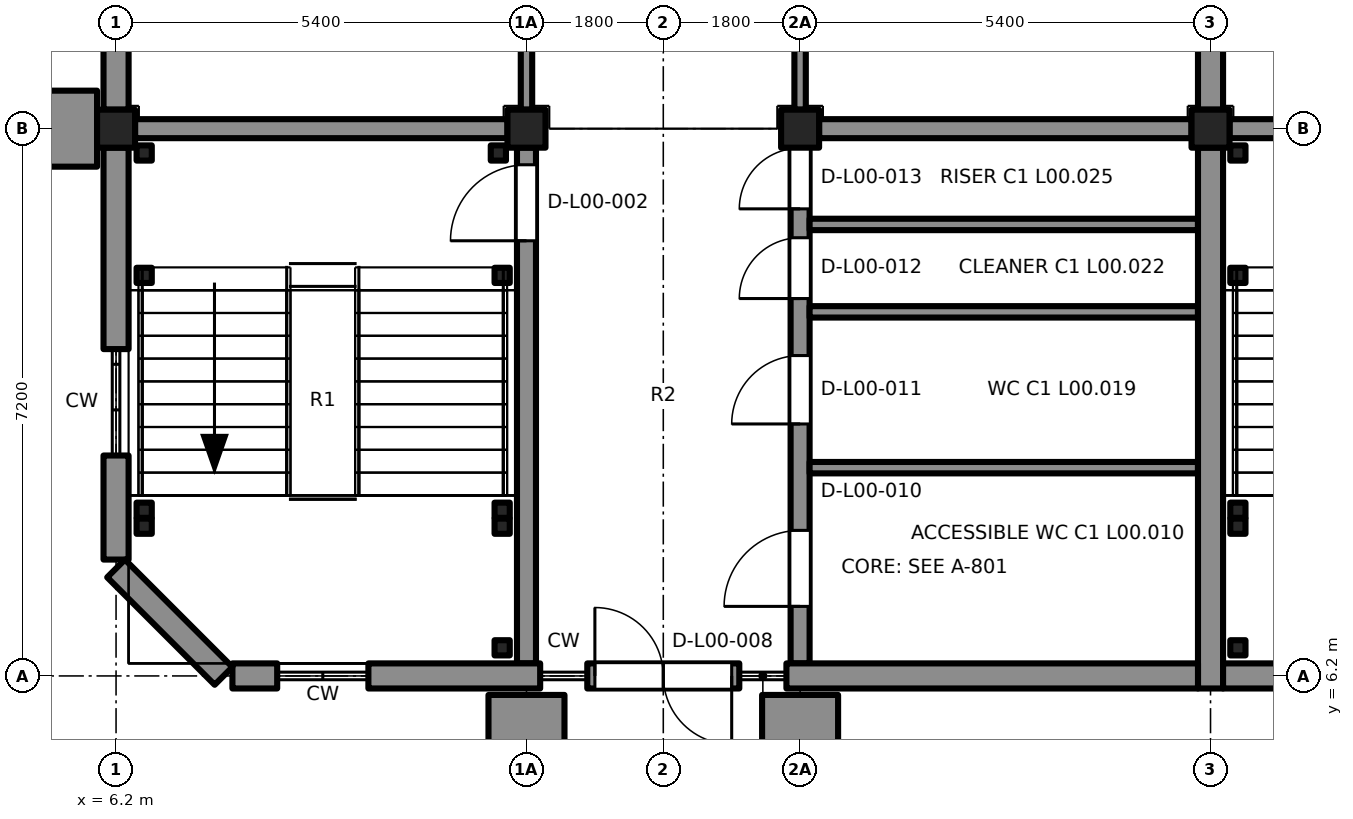
"""IFC4 building model, lengths in metres.
Left out: names, types, materials, properties, quantities, classifications, styles, units other than length and angle.
Written with IfcOpenShell. Run it as: python <this file> out.ifc"""

import sys

from ifc_helpers import new_model, si_unit, direction, frame, frame_2d, origin, origin_2d, place, context, subcontext, project, spatial, rectangle, extrude, element, fill, save


model = new_model("IFC4")
c1 = context("Model", 3, precision=1e-05, world=origin(), true_north=direction((0.0, 1.0)))
c2 = subcontext(c1, "Body", "Model", "MODEL_VIEW")
j1 = project(units=[si_unit("LENGTHUNIT", "METRE"), si_unit("PLANEANGLEUNIT", "RADIAN")], contexts=[c1])
p1 = place(None, origin())
s1 = spatial("IfcSite", under=j1, at=p1, CompositionType="ELEMENT")
p2 = place(p1, origin())
s2 = spatial("IfcBuilding", under=s1, at=p2, CompositionType="ELEMENT")
p3 = place(p2, origin())
s3 = spatial("IfcBuildingStorey", under=s2, at=p3, CompositionType="ELEMENT", Elevation=0.0)
for number, where, z_axis, x_axis in (
    (1, (6.2, 13.4, -0.2), (0.0, 0.0, 1.0), (1.0, 0.0, 0.0)),
    (2, (11.6, 13.4, -0.2), (0.0, 0.0, 1.0), (1.0, 0.0, 0.0)),
    (3, (15.2, 13.4, -0.2), (0.0, 0.0, 1.0), (1.0, 0.0, 0.0)),
    (4, (20.6, 13.4, -0.2), (0.0, 0.0, 1.0), (1.0, 0.0, 0.0)),
):
    element("IfcColumn", number, at=place(p3, frame(where, z_axis=z_axis, x_axis=x_axis)), inside=s3, PredefinedType="COLUMN", context=c2, shape_type="SweptSolid", body=[
        extrude(rectangle(XDim=0.5, YDim=0.5, at=origin_2d()), origin(), (0.0, 0.0, 1.0), 5.45),
    ])
p4 = place(p3, frame((11.6, 6.365, 0.0), z_axis=(0.0, 0.0, 1.0), x_axis=(0.0, 1.0, 0.0)))
e5 = element("IfcWall", 5, at=p4, inside=s3, PredefinedType="SHEAR", context=c2, shape_type="SweptSolid", body=[
    extrude(rectangle(XDim=6.785, YDim=0.25, at=frame_2d((3.393, 0.0))), origin(), (0.0, 0.0, 1.0), 6.05),
])
p5 = place(p4, frame((5.56, 0.0, 0.0)))
e6 = element("IfcOpeningElement", 6, at=p5, cuts=e5, PredefinedType="OPENING", context=c2, shape_type="SweptSolid", body=[
    extrude(rectangle(XDim=1.0, YDim=2.1, at=frame_2d((0.5, 1.05))), frame((0.0, 0.135, 0.0), z_axis=(0.0, -1.0, 0.0), x_axis=(1.0, 0.0, 0.0)), (0.0, 0.0, 1.0), 0.27),
])
p6 = place(p3, frame((6.45, 13.4, 0.0), z_axis=(0.0, 0.0, 1.0), x_axis=(1.0, 0.0, 0.0)))
e7 = element("IfcWall", 7, at=p6, inside=s3, PredefinedType="SHEAR", context=c2, shape_type="SweptSolid", body=[
    extrude(rectangle(XDim=4.9, YDim=0.25, at=frame_2d((2.45, 0.0))), origin(), (0.0, 0.0, 1.0), 6.05),
])
p7 = place(p3, frame((15.2, 6.365, 0.0), z_axis=(0.0, 0.0, 1.0), x_axis=(0.0, 1.0, 0.0)))
e8 = element("IfcWall", 8, at=p7, inside=s3, PredefinedType="SHEAR", context=c2, shape_type="SweptSolid", body=[
    extrude(rectangle(XDim=6.785, YDim=0.25, at=frame_2d((3.393, 0.0))), origin(), (0.0, 0.0, 1.0), 6.05),
])
p8 = place(p7, frame((0.75, 0.0, 0.0)))
e9 = element("IfcOpeningElement", 9, at=p8, cuts=e8, PredefinedType="OPENING", context=c2, shape_type="SweptSolid", body=[
    extrude(rectangle(XDim=1.0, YDim=2.1, at=frame_2d((0.5, 1.05))), frame((0.0, 0.135, 0.0), z_axis=(0.0, -1.0, 0.0), x_axis=(1.0, 0.0, 0.0)), (0.0, 0.0, 1.0), 0.27),
])
p9 = place(p7, frame((3.15, 0.0, 0.0)))
e10 = element("IfcOpeningElement", 10, at=p9, cuts=e8, PredefinedType="OPENING", context=c2, shape_type="SweptSolid", body=[
    extrude(rectangle(XDim=0.9, YDim=2.1, at=frame_2d((0.45, 1.05))), frame((0.0, 0.135, 0.0), z_axis=(0.0, -1.0, 0.0), x_axis=(1.0, 0.0, 0.0)), (0.0, 0.0, 1.0), 0.27),
])
p10 = place(p7, frame((4.8, 0.0, 0.0)))
e11 = element("IfcOpeningElement", 11, at=p10, cuts=e8, PredefinedType="OPENING", context=c2, shape_type="SweptSolid", body=[
    extrude(rectangle(XDim=0.8, YDim=2.1, at=frame_2d((0.4, 1.05))), frame((0.0, 0.135, 0.0), z_axis=(0.0, -1.0, 0.0), x_axis=(1.0, 0.0, 0.0)), (0.0, 0.0, 1.0), 0.27),
])
p11 = place(p7, frame((5.98, 0.0, 0.0)))
e12 = element("IfcOpeningElement", 12, at=p11, cuts=e8, PredefinedType="OPENING", context=c2, shape_type="SweptSolid", body=[
    extrude(rectangle(XDim=0.8, YDim=2.1, at=frame_2d((0.4, 1.05))), frame((0.0, 0.135, 0.0), z_axis=(0.0, -1.0, 0.0), x_axis=(1.0, 0.0, 0.0)), (0.0, 0.0, 1.0), 0.27),
])
p12 = place(p3, frame((15.45, 13.4, 0.0), z_axis=(0.0, 0.0, 1.0), x_axis=(1.0, 0.0, 0.0)))
e13 = element("IfcWall", 13, at=p12, inside=s3, PredefinedType="SHEAR", context=c2, shape_type="SweptSolid", body=[
    extrude(rectangle(XDim=4.9, YDim=0.25, at=frame_2d((2.45, 0.0))), origin(), (0.0, 0.0, 1.0), 6.05),
])
for number, where, z_axis, x_axis in (
    (14, (15.325, 8.94, 0.0), (0.0, 0.0, 1.0), (1.0, 0.0, 0.0)),
    (15, (15.325, 10.99, 0.0), (0.0, 0.0, 1.0), (1.0, 0.0, 0.0)),
    (16, (15.325, 12.14, 0.0), (0.0, 0.0, 1.0), (1.0, 0.0, 0.0)),
):
    element("IfcWall", number, at=place(p3, frame(where, z_axis=z_axis, x_axis=x_axis)), inside=s3, PredefinedType="PARTITIONING", context=c2, shape_type="SweptSolid", body=[
        extrude(rectangle(XDim=5.11, YDim=0.15, at=frame_2d((2.555, 0.0))), origin(), (0.0, 0.0, 1.0), 6.05),
    ])
p13 = place(p3, frame((6.57, 8.38, 0.0), z_axis=(0.0, 0.0, 1.0), x_axis=(1.0, 0.0, 0.0)))
e17 = element("IfcColumn", 17, at=p13, inside=s3, PredefinedType="COLUMN", context=c2, shape_type="SweptSolid", body=[
    extrude(rectangle(XDim=0.2, YDim=0.2, at=origin_2d()), origin(), (0.0, 0.0, 1.0), 4.45),
])
p14 = place(p3, frame((11.28, 6.57, 0.0), z_axis=(0.0, 0.0, 1.0), x_axis=(1.0, 0.0, 0.0)))
e18 = element("IfcColumn", 18, at=p14, inside=s3, PredefinedType="COLUMN", context=c2, shape_type="SweptSolid", body=[
    extrude(rectangle(XDim=0.2, YDim=0.2, at=origin_2d()), origin(), (0.0, 0.0, 1.0), 6.3),
])
p15 = place(p3, frame((11.28, 8.38, 0.0), z_axis=(0.0, 0.0, 1.0), x_axis=(1.0, 0.0, 0.0)))
e19 = element("IfcColumn", 19, at=p15, inside=s3, PredefinedType="COLUMN", context=c2, shape_type="SweptSolid", body=[
    extrude(rectangle(XDim=0.2, YDim=0.2, at=origin_2d()), origin(), (0.0, 0.0, 1.0), 4.45),
])
for number, where, z_axis, x_axis in (
    (20, (6.57, 11.47, 0.0), (0.0, 0.0, 1.0), (1.0, 0.0, 0.0)),
    (21, (6.57, 13.08, 0.0), (0.0, 0.0, 1.0), (1.0, 0.0, 0.0)),
    (22, (11.28, 11.47, 0.0), (0.0, 0.0, 1.0), (1.0, 0.0, 0.0)),
    (23, (11.23, 13.08, 0.0), (0.0, 0.0, 1.0), (1.0, 0.0, 0.0)),
):
    element("IfcColumn", number, at=place(p3, frame(where, z_axis=z_axis, x_axis=x_axis)), inside=s3, PredefinedType="COLUMN", context=c2, shape_type="SweptSolid", body=[
        extrude(rectangle(XDim=0.2, YDim=0.2, at=origin_2d()), origin(), (0.0, 0.0, 1.0), 2.95),
    ])
for number, where, z_axis, x_axis in (
    (24, (6.57, 8.17, 0.0), (0.0, 0.0, 1.0), (1.0, 0.0, 0.0)),
    (25, (11.28, 8.17, 0.0), (0.0, 0.0, 1.0), (1.0, 0.0, 0.0)),
):
    element("IfcColumn", number, at=place(p3, frame(where, z_axis=z_axis, x_axis=x_axis)), inside=s3, PredefinedType="COLUMN", context=c2, shape_type="SweptSolid", body=[
        extrude(rectangle(XDim=0.2, YDim=0.2, at=origin_2d()), origin(), (0.0, 0.0, 1.0), 6.3),
    ])
p16 = place(p3, frame((20.85, 13.4, 0.0), z_axis=(0.0, 0.0, 1.0), x_axis=(1.0, 0.0, 0.0)))
e26 = element("IfcWall", 26, at=p16, inside=s3, PredefinedType="SHEAR", context=c2, shape_type="SweptSolid", body=[
    extrude(rectangle(XDim=4.9, YDim=0.25, at=frame_2d((2.45, 0.0))), origin(), (0.0, 0.0, 1.0), 6.05),
])
p17 = place(p3, frame((20.96, 6.57, 0.0), z_axis=(0.0, 0.0, 1.0), x_axis=(1.0, 0.0, 0.0)))
e27 = element("IfcColumn", 27, at=p17, inside=s3, PredefinedType="COLUMN", context=c2, shape_type="SweptSolid", body=[
    extrude(rectangle(XDim=0.2, YDim=0.2, at=origin_2d()), origin(), (0.0, 0.0, 1.0), 6.3),
])
p18 = place(p3, frame((20.96, 8.38, 0.0), z_axis=(0.0, 0.0, 1.0), x_axis=(1.0, 0.0, 0.0)))
e28 = element("IfcColumn", 28, at=p18, inside=s3, PredefinedType="COLUMN", context=c2, shape_type="SweptSolid", body=[
    extrude(rectangle(XDim=0.2, YDim=0.2, at=origin_2d()), origin(), (0.0, 0.0, 1.0), 4.45),
])
for number, where, z_axis, x_axis in (
    (29, (20.96, 11.47, 0.0), (0.0, 0.0, 1.0), (1.0, 0.0, 0.0)),
    (30, (20.96, 13.08, 0.0), (0.0, 0.0, 1.0), (1.0, 0.0, 0.0)),
):
    element("IfcColumn", number, at=place(p3, frame(where, z_axis=z_axis, x_axis=x_axis)), inside=s3, PredefinedType="COLUMN", context=c2, shape_type="SweptSolid", body=[
        extrude(rectangle(XDim=0.2, YDim=0.2, at=origin_2d()), origin(), (0.0, 0.0, 1.0), 2.95),
    ])
p19 = place(p3, frame((20.96, 8.17, 0.0), z_axis=(0.0, 0.0, 1.0), x_axis=(1.0, 0.0, 0.0)))
e31 = element("IfcColumn", 31, at=p19, inside=s3, PredefinedType="COLUMN", context=c2, shape_type="SweptSolid", body=[
    extrude(rectangle(XDim=0.2, YDim=0.2, at=origin_2d()), origin(), (0.0, 0.0, 1.0), 6.3),
])
p20 = place(p3, frame((6.2, 7.731, 0.0), z_axis=(0.0, 0.0, 1.0), x_axis=(0.0, 1.0, 0.0)))
e32 = element("IfcWall", 32, at=p20, inside=s3, PredefinedType="SOLIDWALL", context=c2, shape_type="SweptSolid", body=[
    extrude(rectangle(XDim=1.369, YDim=0.33, at=frame_2d((0.685, 0.0))), origin(), (0.0, 0.0, 1.0), 5.25),
])
p21 = place(p3, frame((6.2, 10.5, 0.0), z_axis=(0.0, 0.0, 1.0), x_axis=(0.0, 1.0, 0.0)))
e33 = element("IfcWall", 33, at=p21, inside=s3, PredefinedType="SOLIDWALL", context=c2, shape_type="SweptSolid", body=[
    extrude(rectangle(XDim=2.65, YDim=0.33, at=frame_2d((1.325, 0.0))), origin(), (0.0, 0.0, 1.0), 5.25),
])
p22 = place(p3, frame((6.2, 13.65, 0.0), z_axis=(0.0, 0.0, 1.0), x_axis=(0.0, 1.0, 0.0)))
e34 = element("IfcWall", 34, at=p22, inside=s3, PredefinedType="SOLIDWALL", context=c2, shape_type="SweptSolid", body=[
    extrude(rectangle(XDim=6.7, YDim=0.33, at=frame_2d((3.35, 0.0))), origin(), (0.0, 0.0, 1.0), 5.25),
])
p23 = place(p22, frame((0.95, 0.0, 0.9)))
e35 = element("IfcOpeningElement", 35, at=p23, cuts=e34, PredefinedType="OPENING", context=c2, shape_type="SweptSolid", body=[
    extrude(rectangle(XDim=1.2, YDim=1.5, at=frame_2d((0.6, 0.75))), frame((0.0, 0.175, 0.0), z_axis=(0.0, -1.0, 0.0), x_axis=(1.0, 0.0, 0.0)), (0.0, 0.0, 1.0), 0.35),
])
p24 = place(p22, frame((4.85, 0.0, 1.5)))
e36 = element("IfcOpeningElement", 36, at=p24, cuts=e34, PredefinedType="OPENING", context=c2, shape_type="SweptSolid", body=[
    extrude(rectangle(XDim=0.6, YDim=0.6, at=frame_2d((0.3, 0.3))), frame((0.0, 0.175, 0.0), z_axis=(0.0, -1.0, 0.0), x_axis=(1.0, 0.0, 0.0)), (0.0, 0.0, 1.0), 0.35),
])
p25 = place(p3, frame((5.575, 12.9, 0.0), z_axis=(0.0, 0.0, 1.0), x_axis=(0.0, 1.0, 0.0)))
e37 = element("IfcWall", 37, at=p25, inside=s3, PredefinedType="SOLIDWALL", context=c2, shape_type="SweptSolid", body=[
    extrude(rectangle(XDim=1.0, YDim=0.75, at=frame_2d((0.5, 0.0))), origin(), (0.0, 0.0, 1.0), 6.3),
])
p26 = place(p3, frame((20.6, 13.15, 0.0), z_axis=(0.0, 0.0, 1.0), x_axis=(0.0, -1.0, 0.0)))
e38 = element("IfcWall", 38, at=p26, inside=s3, PredefinedType="SOLIDWALL", context=c2, shape_type="SweptSolid", body=[
    extrude(rectangle(XDim=7.115, YDim=0.33, at=frame_2d((3.558, 0.0))), origin(), (0.0, 0.0, 1.0), 5.25),
])
p27 = place(p3, frame((20.6, 20.35, 0.0), z_axis=(0.0, 0.0, 1.0), x_axis=(0.0, -1.0, 0.0)))
e39 = element("IfcWall", 39, at=p27, inside=s3, PredefinedType="SOLIDWALL", context=c2, shape_type="SweptSolid", body=[
    extrude(rectangle(XDim=6.7, YDim=0.33, at=frame_2d((3.35, 0.0))), origin(), (0.0, 0.0, 1.0), 5.25),
])
p28 = place(p3, frame((8.32, 6.2, 0.0), z_axis=(0.0, 0.0, 1.0), x_axis=(-1.0, 0.0, 0.0)))
e40 = element("IfcWall", 40, at=p28, inside=s3, PredefinedType="SOLIDWALL", context=c2, shape_type="SweptSolid", body=[
    extrude(rectangle(XDim=0.589, YDim=0.33, at=frame_2d((0.294, 0.0))), origin(), (0.0, 0.0, 1.0), 5.5),
])
p29 = place(p3, frame((11.78, 6.2, 0.0), z_axis=(0.0, 0.0, 1.0), x_axis=(-1.0, 0.0, 0.0)))
e41 = element("IfcWall", 41, at=p29, inside=s3, PredefinedType="SOLIDWALL", context=c2, shape_type="SweptSolid", body=[
    extrude(rectangle(XDim=2.26, YDim=0.33, at=frame_2d((1.13, 0.0))), origin(), (0.0, 0.0, 1.0), 5.5),
])
p30 = place(p3, frame((14.4, 6.2, 0.0), z_axis=(0.0, 0.0, 1.0), x_axis=(-1.0, 0.0, 0.0)))
e42 = element("IfcWall", 42, at=p30, inside=s3, PredefinedType="SOLIDWALL", context=c2, shape_type="SweptSolid", body=[
    extrude(rectangle(XDim=2.0, YDim=0.33, at=frame_2d((1.0, 0.0))), origin(), (0.0, 0.0, 1.0), 5.5),
])
p31 = place(p30, frame((0.1, 0.0, 0.0)))
e43 = element("IfcOpeningElement", 43, at=p31, cuts=e42, PredefinedType="OPENING", context=c2, shape_type="SweptSolid", body=[
    extrude(rectangle(XDim=1.8, YDim=2.4, at=frame_2d((0.9, 1.2))), frame((0.0, 0.175, 0.0), z_axis=(0.0, -1.0, 0.0), x_axis=(1.0, 0.0, 0.0)), (0.0, 0.0, 1.0), 0.35),
])
p32 = place(p3, frame((20.435, 6.2, 0.0), z_axis=(0.0, 0.0, 1.0), x_axis=(-1.0, 0.0, 0.0)))
e44 = element("IfcWall", 44, at=p32, inside=s3, PredefinedType="SOLIDWALL", context=c2, shape_type="SweptSolid", body=[
    extrude(rectangle(XDim=5.415, YDim=0.33, at=frame_2d((2.708, 0.0))), origin(), (0.0, 0.0, 1.0), 5.5),
])
for number, where, z_axis, x_axis in (
    (45, (12.1, 5.575, 0.0), (0.0, 0.0, 1.0), (-1.0, 0.0, 0.0)),
    (46, (15.7, 5.575, 0.0), (0.0, 0.0, 1.0), (-1.0, 0.0, 0.0)),
):
    element("IfcWall", number, at=place(p3, frame(where, z_axis=z_axis, x_axis=x_axis)), inside=s3, PredefinedType="SOLIDWALL", context=c2, shape_type="SweptSolid", body=[
        extrude(rectangle(XDim=1.0, YDim=0.75, at=frame_2d((0.5, 0.0))), origin(), (0.0, 0.0, 1.0), 6.3),
    ])
p33 = place(p3, frame((6.2, 7.614, 0.0), z_axis=(0.0, 0.0, 1.0), x_axis=(0.707106781187, -0.707106781187, 0.0)))
e47 = element("IfcWall", 47, at=p33, inside=s3, PredefinedType="SOLIDWALL", context=c2, shape_type="SweptSolid", body=[
    extrude(rectangle(XDim=2.0, YDim=0.33, at=frame_2d((1.0, 0.0))), origin(), (0.0, 0.0, 1.0), 5.5),
])
p34 = place(p3, frame((22.72, 6.2, 0.0), z_axis=(0.0, 0.0, 1.0), x_axis=(-1.0, 0.0, 0.0)))
e48 = element("IfcWall", 48, at=p34, inside=s3, PredefinedType="SOLIDWALL", context=c2, shape_type="SweptSolid", body=[
    extrude(rectangle(XDim=1.955, YDim=0.33, at=frame_2d((0.978, 0.0))), origin(), (0.0, 0.0, 1.0), 5.5),
])
p35 = place(p3, frame((11.6, 13.65, 0.0), z_axis=(0.0, 0.0, 1.0), x_axis=(0.0, 1.0, 0.0)))
e49 = element("IfcWall", 49, at=p35, inside=s3, PredefinedType="PARTITIONING", context=c2, shape_type="SweptSolid", body=[
    extrude(rectangle(XDim=3.35, YDim=0.15, at=frame_2d((1.675, 0.0))), origin(), (0.0, 0.0, 1.0), 5.25),
])
p36 = place(p35, frame((1.05, 0.0, 0.0)))
e50 = element("IfcOpeningElement", 50, at=p36, cuts=e49, PredefinedType="OPENING", context=c2, shape_type="SweptSolid", body=[
    extrude(rectangle(XDim=1.0, YDim=2.1, at=frame_2d((0.5, 1.05))), frame((0.0, 0.085, 0.0), z_axis=(0.0, -1.0, 0.0), x_axis=(1.0, 0.0, 0.0)), (0.0, 0.0, 1.0), 0.17),
])
p37 = place(p3, frame((15.2, 17.0, 0.0), z_axis=(0.0, 0.0, 1.0), x_axis=(0.0, -1.0, 0.0)))
e51 = element("IfcWall", 51, at=p37, inside=s3, PredefinedType="PARTITIONING", context=c2, shape_type="SweptSolid", body=[
    extrude(rectangle(XDim=3.35, YDim=0.15, at=frame_2d((1.675, 0.0))), origin(), (0.0, 0.0, 1.0), 5.25),
])
p38 = place(p37, frame((1.3, 0.0, 0.0)))
e52 = element("IfcOpeningElement", 52, at=p38, cuts=e51, PredefinedType="OPENING", context=c2, shape_type="SweptSolid", body=[
    extrude(rectangle(XDim=1.0, YDim=2.1, at=frame_2d((0.5, 1.05))), frame((0.0, 0.085, 0.0), z_axis=(0.0, -1.0, 0.0), x_axis=(1.0, 0.0, 0.0)), (0.0, 0.0, 1.0), 0.17),
])
p39 = place(p5, origin())
e53 = element("IfcDoor", 53, at=p39, inside=s3, OperationType="SINGLE_SWING_LEFT", PredefinedType="DOOR", context=c2, shape_type="SweptSolid", body=[
    extrude(rectangle(XDim=1.0, YDim=2.1, at=frame_2d((0.5, 1.05))), frame((0.0, 0.025, 0.0), z_axis=(0.0, -1.0, 0.0), x_axis=(1.0, 0.0, 0.0)), (0.0, 0.0, 1.0), 0.05),
])
fill(e6, e53)
p40 = place(p8, origin())
e54 = element("IfcDoor", 54, at=p40, inside=s3, OperationType="SINGLE_SWING_LEFT", PredefinedType="DOOR", context=c2, shape_type="SweptSolid", body=[
    extrude(rectangle(XDim=1.0, YDim=2.1, at=frame_2d((0.5, 1.05))), frame((0.0, 0.025, 0.0), z_axis=(0.0, -1.0, 0.0), x_axis=(1.0, 0.0, 0.0)), (0.0, 0.0, 1.0), 0.05),
])
fill(e9, e54)
p41 = place(p9, origin())
e55 = element("IfcDoor", 55, at=p41, inside=s3, OperationType="SINGLE_SWING_LEFT", PredefinedType="DOOR", context=c2, shape_type="SweptSolid", body=[
    extrude(rectangle(XDim=0.9, YDim=2.1, at=frame_2d((0.45, 1.05))), frame((0.0, 0.025, 0.0), z_axis=(0.0, -1.0, 0.0), x_axis=(1.0, 0.0, 0.0)), (0.0, 0.0, 1.0), 0.05),
])
fill(e10, e55)
p42 = place(p10, origin())
e56 = element("IfcDoor", 56, at=p42, inside=s3, OperationType="SINGLE_SWING_LEFT", PredefinedType="DOOR", context=c2, shape_type="SweptSolid", body=[
    extrude(rectangle(XDim=0.8, YDim=2.1, at=frame_2d((0.4, 1.05))), frame((0.0, 0.025, 0.0), z_axis=(0.0, -1.0, 0.0), x_axis=(1.0, 0.0, 0.0)), (0.0, 0.0, 1.0), 0.05),
])
fill(e11, e56)
p43 = place(p11, origin())
e57 = element("IfcDoor", 57, at=p43, inside=s3, OperationType="SINGLE_SWING_LEFT", PredefinedType="DOOR", context=c2, shape_type="SweptSolid", body=[
    extrude(rectangle(XDim=0.8, YDim=2.1, at=frame_2d((0.4, 1.05))), frame((0.0, 0.025, 0.0), z_axis=(0.0, -1.0, 0.0), x_axis=(1.0, 0.0, 0.0)), (0.0, 0.0, 1.0), 0.05),
])
fill(e12, e57)
p44 = place(p31, origin())
e58 = element("IfcDoor", 58, at=p44, inside=s3, OperationType="DOUBLE_DOOR_SINGLE_SWING", PredefinedType="DOOR", context=c2, shape_type="SweptSolid", body=[
    extrude(rectangle(XDim=1.8, YDim=2.4, at=frame_2d((0.9, 1.2))), frame((0.0, 0.025, 0.0), z_axis=(0.0, -1.0, 0.0), x_axis=(1.0, 0.0, 0.0)), (0.0, 0.0, 1.0), 0.05),
])
fill(e43, e58)
save(model, sys.argv[1])
